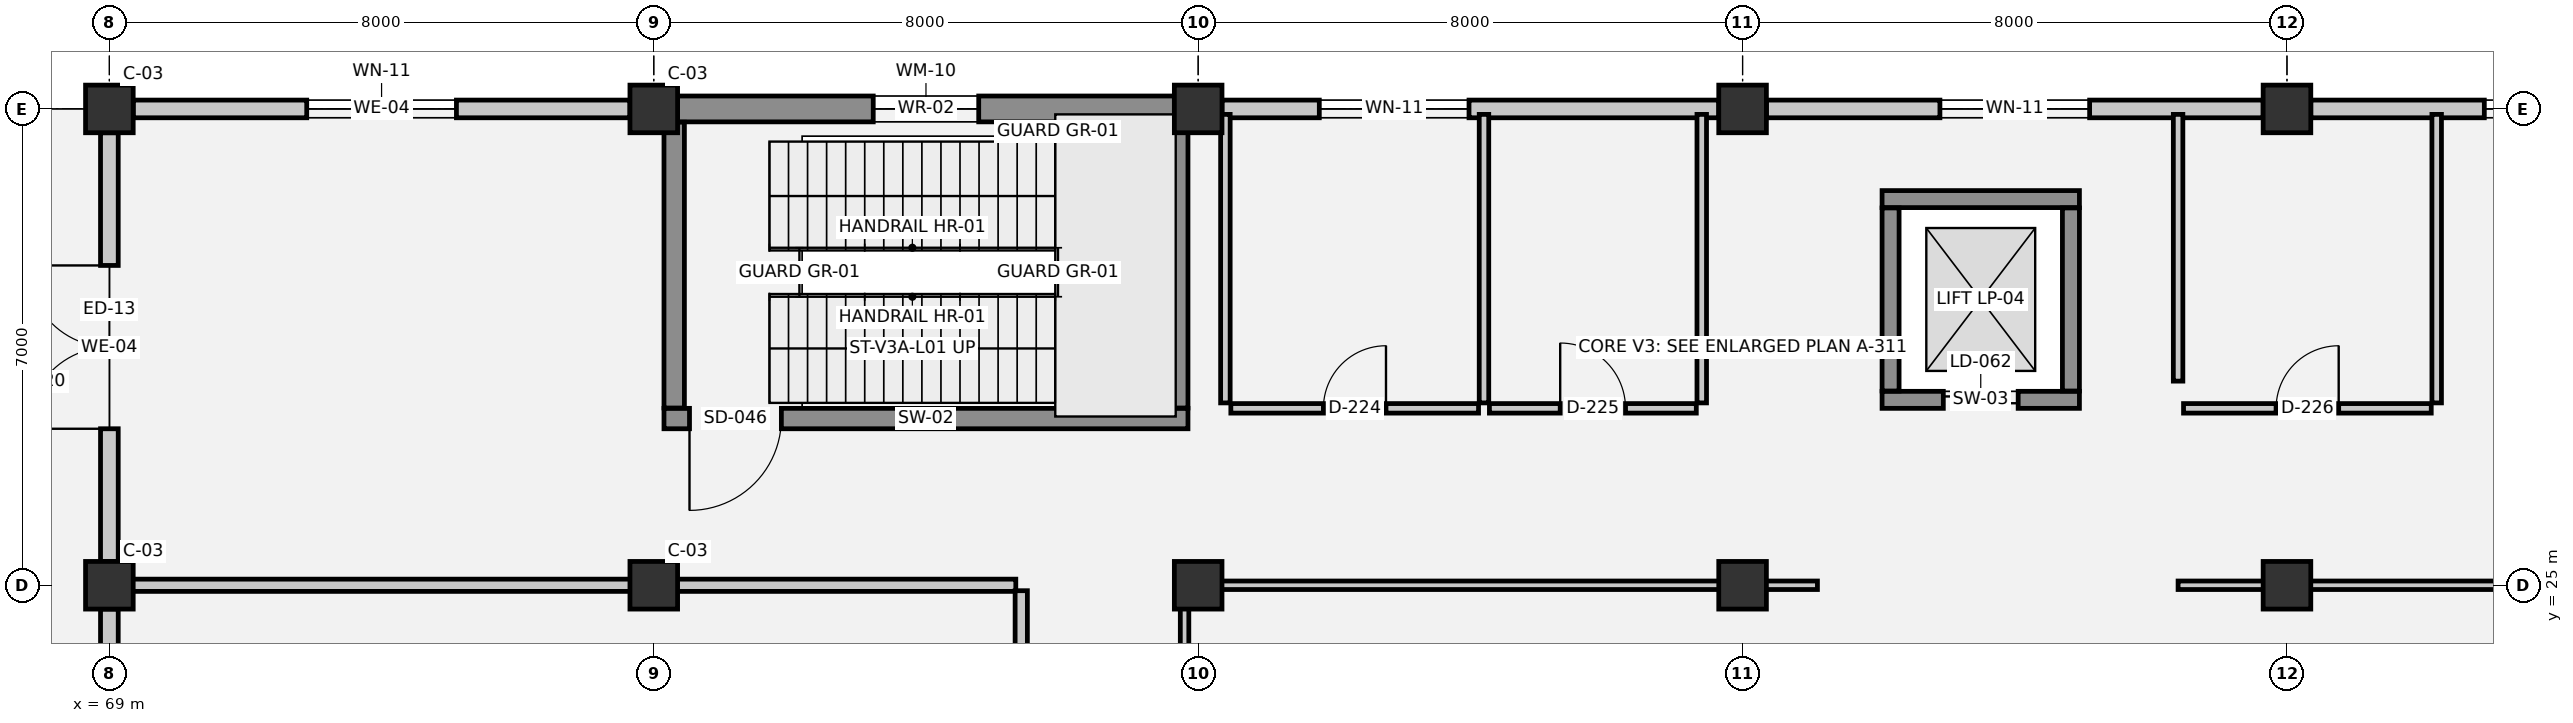
"""IFC4 building model, lengths in metres.
Left out: names, types, materials, properties, quantities, classifications, styles, units other than length and angle.
Written with IfcOpenShell. Run it as: python <this file> out.ifc"""

import sys

from ifc_helpers import new_model, si_unit, direction, frame, frame_2d, origin, origin_2d, place, context, subcontext, project, spatial, rectangle, extrude, element, fill, save


model = new_model("IFC4")
c1 = context("Model", 3, precision=1e-05, world=origin(), true_north=direction((0.0, 1.0)))
c2 = subcontext(c1, "Body", "Model", "MODEL_VIEW")
j1 = project(units=[si_unit("LENGTHUNIT", "METRE"), si_unit("PLANEANGLEUNIT", "RADIAN")], contexts=[c1])
p1 = place(None, origin())
s1 = spatial("IfcSite", under=j1, at=p1, CompositionType="ELEMENT")
p2 = place(p1, origin())
s2 = spatial("IfcBuilding", under=s1, at=p2, CompositionType="ELEMENT")
p3 = place(p2, origin())
s3 = spatial("IfcBuildingStorey", under=s2, at=p3, CompositionType="ELEMENT", Elevation=0.0)
for number, where, z_axis, x_axis in (
    (1, (69.0, 25.0, 0.0), (0.0, 0.0, 1.0), (1.0, 0.0, 0.0)),
    (2, (69.0, 32.0, 0.0), (0.0, 0.0, 1.0), (1.0, 0.0, 0.0)),
    (3, (77.0, 25.0, 0.0), (0.0, 0.0, 1.0), (1.0, 0.0, 0.0)),
    (4, (77.0, 32.0, 0.0), (0.0, 0.0, 1.0), (1.0, 0.0, 0.0)),
    (5, (85.0, 25.0, 0.0), (0.0, 0.0, 1.0), (1.0, 0.0, 0.0)),
    (6, (85.0, 32.0, 0.0), (0.0, 0.0, 1.0), (1.0, 0.0, 0.0)),
    (7, (93.0, 25.0, 0.0), (0.0, 0.0, 1.0), (1.0, 0.0, 0.0)),
    (8, (93.0, 32.0, 0.0), (0.0, 0.0, 1.0), (1.0, 0.0, 0.0)),
    (9, (101.0, 25.0, 0.0), (0.0, 0.0, 1.0), (1.0, 0.0, 0.0)),
    (10, (101.0, 32.0, 0.0), (0.0, 0.0, 1.0), (1.0, 0.0, 0.0)),
):
    element("IfcColumn", number, at=place(p3, frame(where, z_axis=z_axis, x_axis=x_axis)), inside=s3, PredefinedType="COLUMN", context=c2, shape_type="SweptSolid", body=[
        extrude(rectangle(XDim=0.7, YDim=0.7, at=origin_2d()), origin(), (0.0, 0.0, 1.0), 5.4),
    ])
p4 = place(p3, frame((69.0, 17.35, 0.0), z_axis=(0.0, 0.0, 1.0), x_axis=(0.0, 1.0, 0.0)))
e11 = element("IfcWall", 11, at=p4, inside=s3, PredefinedType="SOLIDWALL", context=c2, shape_type="SweptSolid", body=[
    extrude(rectangle(XDim=7.3, YDim=0.26, at=frame_2d((3.65, 0.0))), origin(), (0.0, 0.0, 1.0), 4.34),
])
p5 = place(p4, frame((2.55, 0.0, 0.9)))
e12 = element("IfcOpeningElement", 12, at=p5, cuts=e11, PredefinedType="OPENING", context=c2, shape_type="SweptSolid", body=[
    extrude(rectangle(XDim=2.2, YDim=1.9, at=frame_2d((1.1, 0.95))), frame((0.0, 0.14, 0.0), z_axis=(0.0, -1.0, 0.0), x_axis=(1.0, 0.0, 0.0)), (0.0, 0.0, 1.0), 0.28),
])
p6 = place(p3, frame((69.0, 25.35, 0.0), z_axis=(0.0, 0.0, 1.0), x_axis=(0.0, 1.0, 0.0)))
e13 = element("IfcWall", 13, at=p6, inside=s3, PredefinedType="SOLIDWALL", context=c2, shape_type="SweptSolid", body=[
    extrude(rectangle(XDim=6.3, YDim=0.26, at=frame_2d((3.15, 0.0))), origin(), (0.0, 0.0, 1.0), 4.34),
])
p7 = place(p6, frame((1.95, 0.0, 0.0)))
e14 = element("IfcOpeningElement", 14, at=p7, cuts=e13, PredefinedType="OPENING", context=c2, shape_type="SweptSolid", body=[
    extrude(rectangle(XDim=2.4, YDim=2.4, at=frame_2d((1.2, 1.2))), frame((0.0, 0.14, 0.0), z_axis=(0.0, -1.0, 0.0), x_axis=(1.0, 0.0, 0.0)), (0.0, 0.0, 1.0), 0.28),
])
p8 = place(p3, frame((69.35, 32.0, 0.0), z_axis=(0.0, 0.0, 1.0), x_axis=(1.0, 0.0, 0.0)))
e15 = element("IfcWall", 15, at=p8, inside=s3, PredefinedType="SOLIDWALL", context=c2, shape_type="SweptSolid", body=[
    extrude(rectangle(XDim=7.3, YDim=0.26, at=frame_2d((3.65, 0.0))), origin(), (0.0, 0.0, 1.0), 4.34),
])
p9 = place(p8, frame((2.55, 0.0, 0.9)))
e16 = element("IfcOpeningElement", 16, at=p9, cuts=e15, PredefinedType="OPENING", context=c2, shape_type="SweptSolid", body=[
    extrude(rectangle(XDim=2.2, YDim=1.9, at=frame_2d((1.1, 0.95))), frame((0.0, 0.14, 0.0), z_axis=(0.0, -1.0, 0.0), x_axis=(1.0, 0.0, 0.0)), (0.0, 0.0, 1.0), 0.28),
])
p10 = place(p3, frame((77.35, 32.0, 0.0), z_axis=(0.0, 0.0, 1.0), x_axis=(1.0, 0.0, 0.0)))
e17 = element("IfcWall", 17, at=p10, inside=s3, PredefinedType="STANDARD", context=c2, shape_type="SweptSolid", body=[
    extrude(rectangle(XDim=7.3, YDim=0.38, at=frame_2d((3.65, 0.0))), origin(), (0.0, 0.0, 1.0), 4.34),
])
p11 = place(p10, frame((2.875, 0.0, 0.95)))
e18 = element("IfcOpeningElement", 18, at=p11, cuts=e17, PredefinedType="OPENING", context=c2, shape_type="SweptSolid", body=[
    extrude(rectangle(XDim=1.55, YDim=1.75, at=frame_2d((0.775, 0.875))), frame((0.0, 0.2, 0.0), z_axis=(0.0, -1.0, 0.0), x_axis=(1.0, 0.0, 0.0)), (0.0, 0.0, 1.0), 0.4),
])
p12 = place(p3, frame((85.35, 32.0, 0.0), z_axis=(0.0, 0.0, 1.0), x_axis=(1.0, 0.0, 0.0)))
e19 = element("IfcWall", 19, at=p12, inside=s3, PredefinedType="SOLIDWALL", context=c2, shape_type="SweptSolid", body=[
    extrude(rectangle(XDim=7.3, YDim=0.26, at=frame_2d((3.65, 0.0))), origin(), (0.0, 0.0, 1.0), 4.34),
])
p13 = place(p12, frame((1.43, 0.0, 0.9)))
e20 = element("IfcOpeningElement", 20, at=p13, cuts=e19, PredefinedType="OPENING", context=c2, shape_type="SweptSolid", body=[
    extrude(rectangle(XDim=2.2, YDim=1.9, at=frame_2d((1.1, 0.95))), frame((0.0, 0.14, 0.0), z_axis=(0.0, -1.0, 0.0), x_axis=(1.0, 0.0, 0.0)), (0.0, 0.0, 1.0), 0.28),
])
p14 = place(p3, frame((93.35, 32.0, 0.0), z_axis=(0.0, 0.0, 1.0), x_axis=(1.0, 0.0, 0.0)))
e21 = element("IfcWall", 21, at=p14, inside=s3, PredefinedType="SOLIDWALL", context=c2, shape_type="SweptSolid", body=[
    extrude(rectangle(XDim=7.3, YDim=0.26, at=frame_2d((3.65, 0.0))), origin(), (0.0, 0.0, 1.0), 4.34),
])
p15 = place(p14, frame((2.55, 0.0, 0.9)))
e22 = element("IfcOpeningElement", 22, at=p15, cuts=e21, PredefinedType="OPENING", context=c2, shape_type="SweptSolid", body=[
    extrude(rectangle(XDim=2.2, YDim=1.9, at=frame_2d((1.1, 0.95))), frame((0.0, 0.14, 0.0), z_axis=(0.0, -1.0, 0.0), x_axis=(1.0, 0.0, 0.0)), (0.0, 0.0, 1.0), 0.28),
])
p16 = place(p3, frame((101.35, 32.0, 0.0), z_axis=(0.0, 0.0, 1.0), x_axis=(1.0, 0.0, 0.0)))
e23 = element("IfcWall", 23, at=p16, inside=s3, PredefinedType="SOLIDWALL", context=c2, shape_type="SweptSolid", body=[
    extrude(rectangle(XDim=7.3, YDim=0.26, at=frame_2d((3.65, 0.0))), origin(), (0.0, 0.0, 1.0), 4.34),
])
p17 = place(p16, frame((2.55, 0.0, 0.9)))
e24 = element("IfcOpeningElement", 24, at=p17, cuts=e23, PredefinedType="OPENING", context=c2, shape_type="SweptSolid", body=[
    extrude(rectangle(XDim=2.2, YDim=1.9, at=frame_2d((1.1, 0.95))), frame((0.0, 0.14, 0.0), z_axis=(0.0, -1.0, 0.0), x_axis=(1.0, 0.0, 0.0)), (0.0, 0.0, 1.0), 0.28),
])
p18 = place(p3, frame((95.05, 27.725, 0.0), z_axis=(0.0, 0.0, 1.0), x_axis=(1.0, 0.0, 0.0)))
e25 = element("IfcWall", 25, at=p18, inside=s3, PredefinedType="SHEAR", context=c2, shape_type="SweptSolid", body=[
    extrude(rectangle(XDim=2.9, YDim=0.25, at=frame_2d((1.45, 0.0))), origin(), (0.0, 0.0, 1.0), 5.4),
])
p19 = place(p18, frame((0.9, 0.0, 0.0)))
e26 = element("IfcOpeningElement", 26, at=p19, cuts=e25, PredefinedType="OPENING", context=c2, shape_type="SweptSolid", body=[
    extrude(rectangle(XDim=1.1, YDim=2.15, at=frame_2d((0.55, 1.075))), frame((0.0, 0.135, 0.0), z_axis=(0.0, -1.0, 0.0), x_axis=(1.0, 0.0, 0.0)), (0.0, 0.0, 1.0), 0.27),
])
p20 = place(p3, frame((97.95, 30.675, 0.0), z_axis=(0.0, 0.0, 1.0), x_axis=(-1.0, 0.0, 0.0)))
e27 = element("IfcWall", 27, at=p20, inside=s3, PredefinedType="SHEAR", context=c2, shape_type="SweptSolid", body=[
    extrude(rectangle(XDim=2.9, YDim=0.25, at=frame_2d((1.45, 0.0))), origin(), (0.0, 0.0, 1.0), 5.4),
])
for number, where, z_axis, x_axis in (
    (28, (95.175, 30.545, 0.0), (0.0, 0.0, 1.0), (0.0, -1.0, 0.0)),
    (29, (97.825, 27.855, 0.0), (0.0, 0.0, 1.0), (0.0, 1.0, 0.0)),
):
    element("IfcWall", number, at=place(p3, frame(where, z_axis=z_axis, x_axis=x_axis)), inside=s3, PredefinedType="SHEAR", context=c2, shape_type="SweptSolid", body=[
        extrude(rectangle(XDim=2.69, YDim=0.25, at=frame_2d((1.345, 0.0))), origin(), (0.0, 0.0, 1.0), 5.4),
    ])
p21 = place(p3, frame((84.85, 27.45, 0.0), z_axis=(0.0, 0.0, 1.0), x_axis=(-1.0, 0.0, 0.0)))
e30 = element("IfcWall", 30, at=p21, inside=s3, PredefinedType="SHEAR", context=c2, shape_type="SweptSolid", body=[
    extrude(rectangle(XDim=7.7, YDim=0.3, at=frame_2d((3.85, 0.0))), origin(), (0.0, 0.0, 1.0), 5.06),
])
p22 = place(p21, frame((5.975, 0.0, 0.0)))
e31 = element("IfcOpeningElement", 31, at=p22, cuts=e30, PredefinedType="OPENING", context=c2, shape_type="SweptSolid", body=[
    extrude(rectangle(XDim=1.35, YDim=2.2, at=frame_2d((0.675, 1.1))), frame((0.0, 0.16, 0.0), z_axis=(0.0, -1.0, 0.0), x_axis=(1.0, 0.0, 0.0)), (0.0, 0.0, 1.0), 0.32),
])
for number, where, z_axis, x_axis in (
    (32, (77.3, 31.805, 0.0), (0.0, 0.0, 1.0), (0.0, -1.0, 0.0)),
    (33, (84.7, 27.605, 0.0), (0.0, 0.0, 1.0), (0.0, 1.0, 0.0)),
):
    element("IfcWall", number, at=place(p3, frame(where, z_axis=z_axis, x_axis=x_axis)), inside=s3, PredefinedType="SHEAR", context=c2, shape_type="SweptSolid", body=[
        extrude(rectangle(XDim=4.2, YDim=0.3, at=frame_2d((2.1, 0.0))), origin(), (0.0, 0.0, 1.0), 5.06),
    ])
p23 = place(p3, frame((69.08, 25.0, 0.0), z_axis=(0.0, 0.0, 1.0), x_axis=(1.0, 0.0, 0.0)))
e34 = element("IfcWall", 34, at=p23, inside=s3, PredefinedType="PARTITIONING", context=c2, shape_type="SweptSolid", body=[
    extrude(rectangle(XDim=13.24, YDim=0.18, at=frame_2d((6.62, 0.0))), origin(), (0.0, 0.0, 1.0), 4.36),
])
p24 = place(p3, frame((84.88, 25.0, 0.0), z_axis=(0.0, 0.0, 1.0), x_axis=(1.0, 0.0, 0.0)))
e35 = element("IfcWall", 35, at=p24, inside=s3, PredefinedType="PARTITIONING", context=c2, shape_type="SweptSolid", body=[
    extrude(rectangle(XDim=9.22, YDim=0.125, at=frame_2d((4.61, 0.0))), origin(), (0.0, 0.0, 1.0), 4.36),
])
p25 = place(p3, frame((99.4, 25.0, 0.0), z_axis=(0.0, 0.0, 1.0), x_axis=(1.0, 0.0, 0.0)))
e36 = element("IfcWall", 36, at=p25, inside=s3, PredefinedType="PARTITIONING", context=c2, shape_type="SweptSolid", body=[
    extrude(rectangle(XDim=17.52, YDim=0.125, at=frame_2d((8.76, 0.0))), origin(), (0.0, 0.0, 1.0), 4.36),
])
p26 = place(p25, frame((5.908, 0.0, 0.0)))
e37 = element("IfcOpeningElement", 37, at=p26, cuts=e36, PredefinedType="OPENING", context=c2, shape_type="SweptSolid", body=[
    extrude(rectangle(XDim=0.94, YDim=2.15, at=frame_2d((0.47, 1.075))), frame((0.0, 0.073, 0.0), z_axis=(0.0, -1.0, 0.0), x_axis=(1.0, 0.0, 0.0)), (0.0, 0.0, 1.0), 0.145),
])
p27 = place(p3, frame((85.48, 27.6, 0.0), z_axis=(0.0, 0.0, 1.0), x_axis=(1.0, 0.0, 0.0)))
e38 = element("IfcWall", 38, at=p27, inside=s3, PredefinedType="PLUMBINGWALL", context=c2, shape_type="SweptSolid", body=[
    extrude(rectangle(XDim=3.64, YDim=0.14, at=frame_2d((1.82, 0.0))), origin(), (0.0, 0.0, 1.0), 5.04),
])
p28 = place(p27, frame((1.36, 0.0, 0.0)))
e39 = element("IfcOpeningElement", 39, at=p28, cuts=e38, PredefinedType="OPENING", context=c2, shape_type="SweptSolid", body=[
    extrude(rectangle(XDim=0.92, YDim=2.1, at=frame_2d((0.46, 1.05))), frame((0.0, 0.08, 0.0), z_axis=(0.0, -1.0, 0.0), x_axis=(1.0, 0.0, 0.0)), (0.0, 0.0, 1.0), 0.16),
])
p29 = place(p3, frame((89.28, 27.6, 0.0), z_axis=(0.0, 0.0, 1.0), x_axis=(1.0, 0.0, 0.0)))
e40 = element("IfcWall", 40, at=p29, inside=s3, PredefinedType="PLUMBINGWALL", context=c2, shape_type="SweptSolid", body=[
    extrude(rectangle(XDim=3.04, YDim=0.14, at=frame_2d((1.52, 0.0))), origin(), (0.0, 0.0, 1.0), 5.04),
])
p30 = place(p29, frame((1.04, 0.0, 0.0)))
e41 = element("IfcOpeningElement", 41, at=p30, cuts=e40, PredefinedType="OPENING", context=c2, shape_type="SweptSolid", body=[
    extrude(rectangle(XDim=0.96, YDim=2.1, at=frame_2d((0.48, 1.05))), frame((0.0, 0.08, 0.0), z_axis=(0.0, -1.0, 0.0), x_axis=(1.0, 0.0, 0.0)), (0.0, 0.0, 1.0), 0.16),
])
p31 = place(p3, frame((99.48, 27.6, 0.0), z_axis=(0.0, 0.0, 1.0), x_axis=(1.0, 0.0, 0.0)))
e42 = element("IfcWall", 42, at=p31, inside=s3, PredefinedType="PLUMBINGWALL", context=c2, shape_type="SweptSolid", body=[
    extrude(rectangle(XDim=3.64, YDim=0.14, at=frame_2d((1.82, 0.0))), origin(), (0.0, 0.0, 1.0), 5.04),
])
p32 = place(p31, frame((1.36, 0.0, 0.0)))
e43 = element("IfcOpeningElement", 43, at=p32, cuts=e42, PredefinedType="OPENING", context=c2, shape_type="SweptSolid", body=[
    extrude(rectangle(XDim=0.92, YDim=2.1, at=frame_2d((0.46, 1.05))), frame((0.0, 0.08, 0.0), z_axis=(0.0, -1.0, 0.0), x_axis=(1.0, 0.0, 0.0)), (0.0, 0.0, 1.0), 0.16),
])
p33 = place(p3, frame((82.4, 10.08, 0.0), z_axis=(0.0, 0.0, 1.0), x_axis=(0.0, 1.0, 0.0)))
e44 = element("IfcWall", 44, at=p33, inside=s3, PredefinedType="PARTITIONING", context=c2, shape_type="SweptSolid", body=[
    extrude(rectangle(XDim=14.84, YDim=0.18, at=frame_2d((7.42, 0.0))), origin(), (0.0, 0.0, 1.0), 5.04),
])
p34 = place(p33, frame((6.845, 0.0, 0.0)))
e45 = element("IfcOpeningElement", 45, at=p34, cuts=e44, PredefinedType="OPENING", context=c2, shape_type="SweptSolid", body=[
    extrude(rectangle(XDim=1.15, YDim=2.2, at=frame_2d((0.575, 1.1))), frame((0.0, 0.1, 0.0), z_axis=(0.0, -1.0, 0.0), x_axis=(1.0, 0.0, 0.0)), (0.0, 0.0, 1.0), 0.2),
])
p35 = place(p3, frame((84.8, 10.08, 0.0), z_axis=(0.0, 0.0, 1.0), x_axis=(0.0, 1.0, 0.0)))
e46 = element("IfcWall", 46, at=p35, inside=s3, PredefinedType="PARTITIONING", context=c2, shape_type="SweptSolid", body=[
    extrude(rectangle(XDim=14.84, YDim=0.125, at=frame_2d((7.42, 0.0))), origin(), (0.0, 0.0, 1.0), 4.51),
])
for number, where, z_axis, x_axis in (
    (47, (85.4, 27.68, 0.0), (0.0, 0.0, 1.0), (0.0, 1.0, 0.0)),
    (48, (89.2, 27.68, 0.0), (0.0, 0.0, 1.0), (0.0, 1.0, 0.0)),
    (49, (92.4, 27.68, 0.0), (0.0, 0.0, 1.0), (0.0, 1.0, 0.0)),
):
    element("IfcWall", number, at=place(p3, frame(where, z_axis=z_axis, x_axis=x_axis)), inside=s3, PredefinedType="PLUMBINGWALL", context=c2, shape_type="SweptSolid", body=[
        extrude(rectangle(XDim=4.24, YDim=0.14, at=frame_2d((2.12, 0.0))), origin(), (0.0, 0.0, 1.0), 5.04),
    ])
p36 = place(p3, frame((99.4, 28.0, 0.0), z_axis=(0.0, 0.0, 1.0), x_axis=(0.0, 1.0, 0.0)))
e50 = element("IfcWall", 50, at=p36, inside=s3, PredefinedType="PLUMBINGWALL", context=c2, shape_type="SweptSolid", body=[
    extrude(rectangle(XDim=3.92, YDim=0.14, at=frame_2d((1.96, 0.0))), origin(), (0.0, 0.0, 1.0), 5.04),
])
p37 = place(p3, frame((103.2, 27.68, 0.0), z_axis=(0.0, 0.0, 1.0), x_axis=(0.0, 1.0, 0.0)))
e51 = element("IfcWall", 51, at=p37, inside=s3, PredefinedType="PLUMBINGWALL", context=c2, shape_type="SweptSolid", body=[
    extrude(rectangle(XDim=4.24, YDim=0.14, at=frame_2d((2.12, 0.0))), origin(), (0.0, 0.0, 1.0), 5.04),
])
p38 = place(p7, origin())
e52 = element("IfcDoor", 52, at=p38, inside=s3, OperationType="DOUBLE_DOOR_SINGLE_SWING", PredefinedType="DOOR", context=c2, shape_type="SweptSolid", body=[
    extrude(rectangle(XDim=2.4, YDim=2.4, at=frame_2d((1.2, 1.2))), frame((0.0, 0.025, 0.0), z_axis=(0.0, -1.0, 0.0), x_axis=(1.0, 0.0, 0.0)), (0.0, 0.0, 1.0), 0.05),
])
fill(e14, e52)
p39 = place(p9, origin())
e53 = element("IfcWindow", 53, at=p39, inside=s3, PartitioningType="SINGLE_PANEL", PredefinedType="WINDOW", context=c2, shape_type="SweptSolid", body=[
    extrude(rectangle(XDim=2.2, YDim=1.9, at=frame_2d((1.1, 0.95))), frame((0.0, 0.03, 0.0), z_axis=(0.0, -1.0, 0.0), x_axis=(1.0, 0.0, 0.0)), (0.0, 0.0, 1.0), 0.06),
])
fill(e16, e53)
p40 = place(p13, origin())
e54 = element("IfcWindow", 54, at=p40, inside=s3, PartitioningType="SINGLE_PANEL", PredefinedType="WINDOW", context=c2, shape_type="SweptSolid", body=[
    extrude(rectangle(XDim=2.2, YDim=1.9, at=frame_2d((1.1, 0.95))), frame((0.0, 0.03, 0.0), z_axis=(0.0, -1.0, 0.0), x_axis=(1.0, 0.0, 0.0)), (0.0, 0.0, 1.0), 0.06),
])
fill(e20, e54)
p41 = place(p15, origin())
e55 = element("IfcWindow", 55, at=p41, inside=s3, PartitioningType="SINGLE_PANEL", PredefinedType="WINDOW", context=c2, shape_type="SweptSolid", body=[
    extrude(rectangle(XDim=2.2, YDim=1.9, at=frame_2d((1.1, 0.95))), frame((0.0, 0.03, 0.0), z_axis=(0.0, -1.0, 0.0), x_axis=(1.0, 0.0, 0.0)), (0.0, 0.0, 1.0), 0.06),
])
fill(e22, e55)
p42 = place(p17, origin())
e56 = element("IfcWindow", 56, at=p42, inside=s3, PartitioningType="SINGLE_PANEL", PredefinedType="WINDOW", context=c2, shape_type="SweptSolid", body=[
    extrude(rectangle(XDim=2.2, YDim=1.9, at=frame_2d((1.1, 0.95))), frame((0.0, 0.03, 0.0), z_axis=(0.0, -1.0, 0.0), x_axis=(1.0, 0.0, 0.0)), (0.0, 0.0, 1.0), 0.06),
])
fill(e24, e56)
p43 = place(p19, origin())
e57 = element("IfcDoor", 57, at=p43, inside=s3, OperationType="DOUBLE_DOOR_SLIDING", PredefinedType="DOOR", context=c2, shape_type="SweptSolid", body=[
    extrude(rectangle(XDim=1.1, YDim=2.15, at=frame_2d((0.55, 1.075))), frame((0.0, 0.025, 0.0), z_axis=(0.0, -1.0, 0.0), x_axis=(1.0, 0.0, 0.0)), (0.0, 0.0, 1.0), 0.05),
])
fill(e26, e57)
p44 = place(p22, origin())
e58 = element("IfcDoor", 58, at=p44, inside=s3, OperationType="SINGLE_SWING_RIGHT", PredefinedType="DOOR", context=c2, shape_type="SweptSolid", body=[
    extrude(rectangle(XDim=1.35, YDim=2.2, at=frame_2d((0.675, 1.1))), frame((0.0, 0.025, 0.0), z_axis=(0.0, -1.0, 0.0), x_axis=(1.0, 0.0, 0.0)), (0.0, 0.0, 1.0), 0.05),
])
fill(e31, e58)
p45 = place(p28, origin())
e59 = element("IfcDoor", 59, at=p45, inside=s3, OperationType="SINGLE_SWING_RIGHT", PredefinedType="DOOR", context=c2, shape_type="SweptSolid", body=[
    extrude(rectangle(XDim=0.92, YDim=2.1, at=frame_2d((0.46, 1.05))), frame((0.0, 0.025, 0.0), z_axis=(0.0, -1.0, 0.0), x_axis=(1.0, 0.0, 0.0)), (0.0, 0.0, 1.0), 0.05),
])
fill(e39, e59)
p46 = place(p30, origin())
e60 = element("IfcDoor", 60, at=p46, inside=s3, OperationType="SINGLE_SWING_LEFT", PredefinedType="DOOR", context=c2, shape_type="SweptSolid", body=[
    extrude(rectangle(XDim=0.96, YDim=2.1, at=frame_2d((0.48, 1.05))), frame((0.0, 0.025, 0.0), z_axis=(0.0, -1.0, 0.0), x_axis=(1.0, 0.0, 0.0)), (0.0, 0.0, 1.0), 0.05),
])
fill(e41, e60)
p47 = place(p32, origin())
e61 = element("IfcDoor", 61, at=p47, inside=s3, OperationType="SINGLE_SWING_RIGHT", PredefinedType="DOOR", context=c2, shape_type="SweptSolid", body=[
    extrude(rectangle(XDim=0.92, YDim=2.1, at=frame_2d((0.46, 1.05))), frame((0.0, 0.025, 0.0), z_axis=(0.0, -1.0, 0.0), x_axis=(1.0, 0.0, 0.0)), (0.0, 0.0, 1.0), 0.05),
])
fill(e43, e61)
p48 = place(p11, origin())
e62 = element("IfcWindow", 62, at=p48, inside=s3, PartitioningType="SINGLE_PANEL", PredefinedType="WINDOW", context=c2, shape_type="SweptSolid", body=[
    extrude(rectangle(XDim=1.55, YDim=1.75, at=frame_2d((0.775, 0.875))), frame((0.0, 0.03, 0.0), z_axis=(0.0, -1.0, 0.0), x_axis=(1.0, 0.0, 0.0)), (0.0, 0.0, 1.0), 0.06),
])
fill(e18, e62)
save(model, sys.argv[1])
